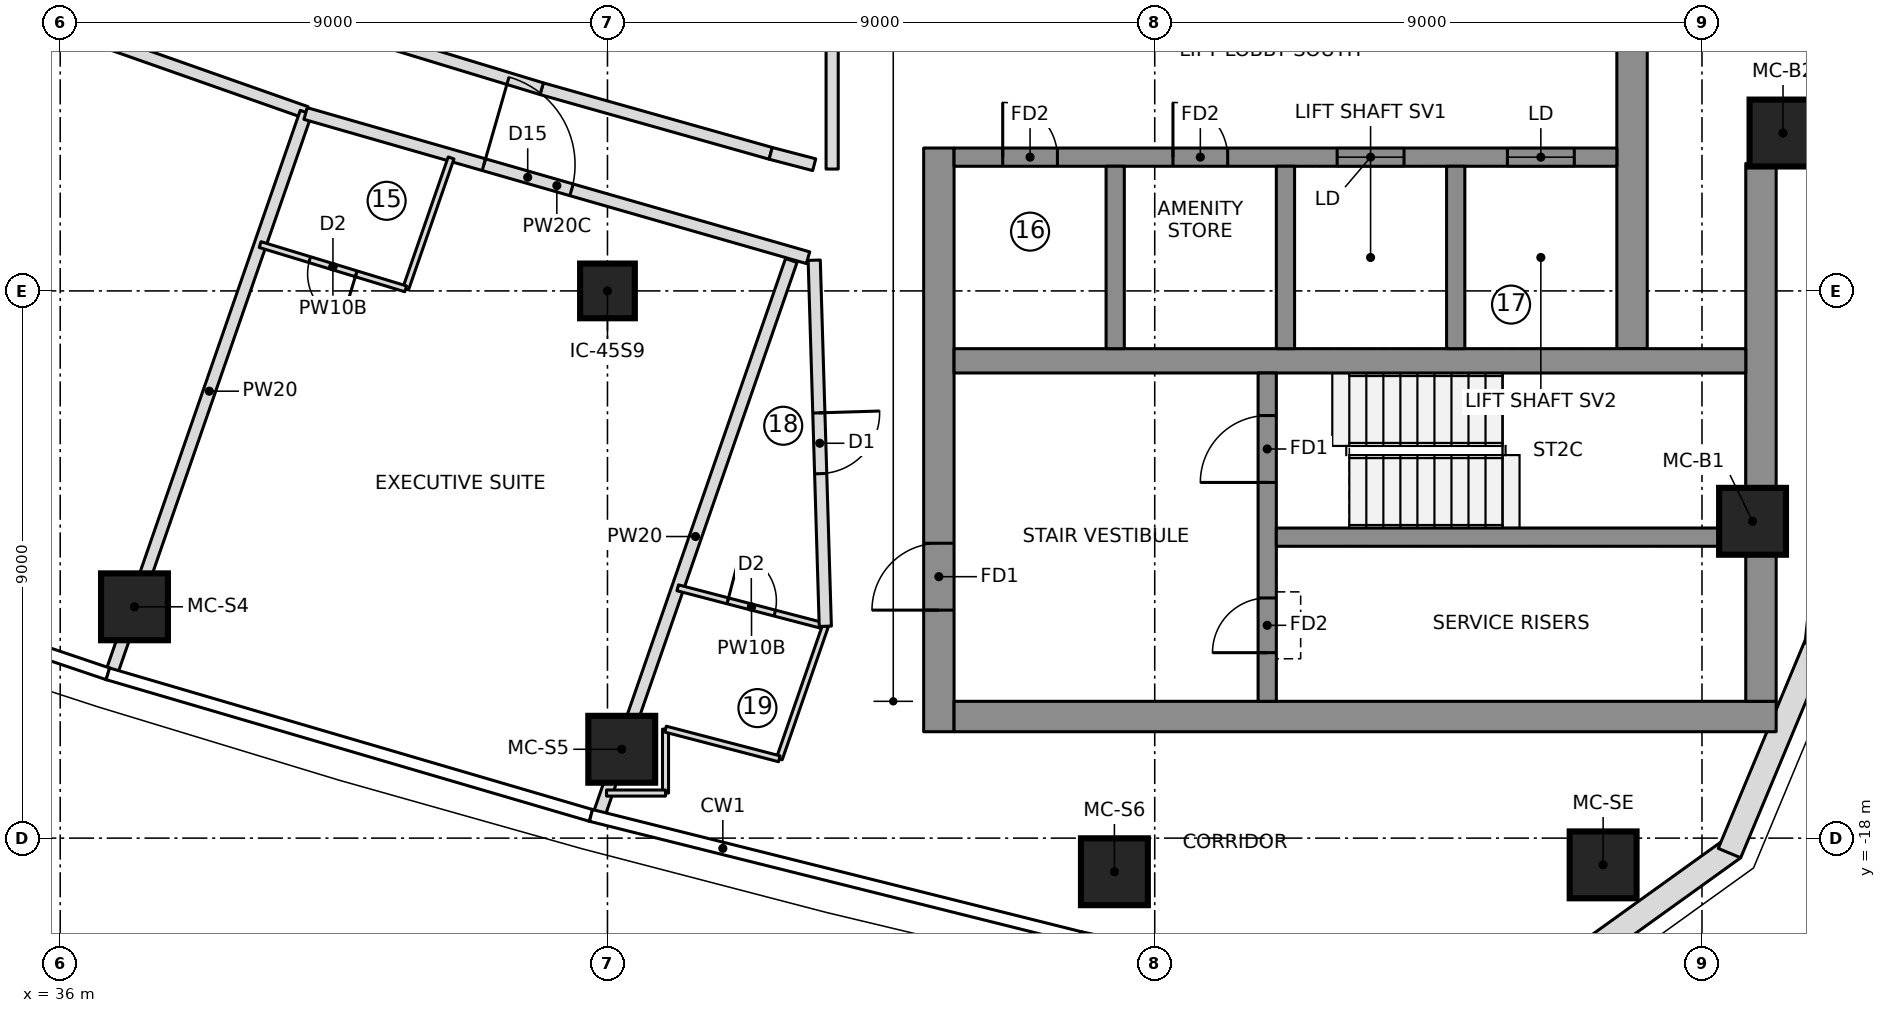
"""IFC4 building model, lengths in metres.
Left out: names, types, materials, properties, quantities, classifications, styles, units other than length and angle.
Written with IfcOpenShell. Run it as: python <this file> out.ifc"""

import sys

from ifc_helpers import new_model, si_unit, direction, frame, frame_2d, origin, origin_2d, place, context, subcontext, project, spatial, polyline, rectangle, outline, extrude, element, fill, save


model = new_model("IFC4")
c1 = context("Model", 3, precision=1e-05, world=origin(), true_north=direction((0.0, 1.0)))
c2 = subcontext(c1, "Body", "Model", "MODEL_VIEW")
j1 = project(units=[si_unit("LENGTHUNIT", "METRE"), si_unit("PLANEANGLEUNIT", "RADIAN")], contexts=[c1])
p1 = place(None, origin())
s1 = spatial("IfcSite", under=j1, at=p1, CompositionType="ELEMENT")
p2 = place(p1, origin())
s2 = spatial("IfcBuilding", under=s1, at=p2, CompositionType="ELEMENT")
p3 = place(p2, frame((0.0, 0.0, 289.2)))
s3 = spatial("IfcBuildingStorey", under=s2, at=p3, CompositionType="ELEMENT", Elevation=289.2)
p4 = place(p3, frame((50.45, -16.25, 0.0), z_axis=(0.0, 0.0, 1.0), x_axis=(0.0, 1.0, 0.0)))
e1 = element("IfcWall", 1, at=p4, inside=s3, PredefinedType="SHEAR", context=c2, shape_type="SweptSolid", body=[
    extrude(rectangle(XDim=9.6, YDim=0.5, at=frame_2d((4.8, 0.0))), origin(), (0.0, 0.0, 1.0), 3.55),
])
p5 = place(p4, frame((2.0, 0.0, 0.0)))
e2 = element("IfcOpeningElement", 2, at=p5, cuts=e1, PredefinedType="OPENING", context=c2, shape_type="SweptSolid", body=[
    extrude(rectangle(XDim=1.1, YDim=2.1, at=frame_2d((0.55, 1.05))), frame((0.0, 0.26, 0.0), z_axis=(0.0, -1.0, 0.0), x_axis=(1.0, 0.0, 0.0)), (0.0, 0.0, 1.0), 0.52),
])
p6 = place(p3, frame((50.7, -16.0, 0.0), z_axis=(0.0, 0.0, 1.0), x_axis=(1.0, 0.0, 0.0)))
e3 = element("IfcWall", 3, at=p6, inside=s3, PredefinedType="SHEAR", context=c2, shape_type="SweptSolid", body=[
    extrude(rectangle(XDim=13.52, YDim=0.5, at=frame_2d((6.76, 0.0))), origin(), (0.0, 0.0, 1.0), 3.55),
])
p7 = place(p3, frame((63.97, -15.75, 0.0), z_axis=(0.0, 0.0, 1.0), x_axis=(0.0, 1.0, 0.0)))
e4 = element("IfcWall", 4, at=p7, inside=s3, PredefinedType="SHEAR", context=c2, shape_type="SweptSolid", body=[
    extrude(rectangle(XDim=8.847, YDim=0.5, at=frame_2d((4.423, 0.0))), origin(), (0.0, 0.0, 1.0), 3.55),
])
p8 = place(p3, frame((61.85, -9.95, 0.0), z_axis=(0.0, 0.0, 1.0), x_axis=(0.0, 1.0, 0.0)))
e5 = element("IfcWall", 5, at=p8, inside=s3, PredefinedType="SHEAR", context=c2, shape_type="SweptSolid", body=[
    extrude(rectangle(XDim=19.9, YDim=0.5, at=frame_2d((9.95, 0.0))), origin(), (0.0, 0.0, 1.0), 3.55),
])
p9 = place(p3, frame((50.7, -10.15, 0.0), z_axis=(0.0, 0.0, 1.0), x_axis=(1.0, 0.0, 0.0)))
e6 = element("IfcWall", 6, at=p9, inside=s3, PredefinedType="SHEAR", context=c2, shape_type="SweptSolid", body=[
    extrude(rectangle(XDim=13.02, YDim=0.4, at=frame_2d((6.51, 0.0))), origin(), (0.0, 0.0, 1.0), 3.55),
])
p10 = place(p3, frame((50.7, -6.8, 0.0), z_axis=(0.0, 0.0, 1.0), x_axis=(1.0, 0.0, 0.0)))
e7 = element("IfcWall", 7, at=p10, inside=s3, PredefinedType="SHEAR", context=c2, shape_type="SweptSolid", body=[
    extrude(rectangle(XDim=10.9, YDim=0.3, at=frame_2d((5.45, 0.0))), origin(), (0.0, 0.0, 1.0), 3.55),
])
p11 = place(p10, frame((6.3, 0.0, 0.0)))
e8 = element("IfcOpeningElement", 8, at=p11, cuts=e7, PredefinedType="OPENING", context=c2, shape_type="SweptSolid", body=[
    extrude(rectangle(XDim=1.1, YDim=2.1, at=frame_2d((0.55, 1.05))), frame((0.0, 0.16, 0.0), z_axis=(0.0, -1.0, 0.0), x_axis=(1.0, 0.0, 0.0)), (0.0, 0.0, 1.0), 0.32),
])
p12 = place(p10, frame((9.1, 0.0, 0.0)))
e9 = element("IfcOpeningElement", 9, at=p12, cuts=e7, PredefinedType="OPENING", context=c2, shape_type="SweptSolid", body=[
    extrude(rectangle(XDim=1.1, YDim=2.1, at=frame_2d((0.55, 1.05))), frame((0.0, 0.16, 0.0), z_axis=(0.0, -1.0, 0.0), x_axis=(1.0, 0.0, 0.0)), (0.0, 0.0, 1.0), 0.32),
])
p13 = place(p10, frame((0.8, 0.0, 0.0)))
e10 = element("IfcOpeningElement", 10, at=p13, cuts=e7, PredefinedType="OPENING", context=c2, shape_type="SweptSolid", body=[
    extrude(rectangle(XDim=0.9, YDim=2.1, at=frame_2d((0.45, 1.05))), frame((0.0, 0.16, 0.0), z_axis=(0.0, -1.0, 0.0), x_axis=(1.0, 0.0, 0.0)), (0.0, 0.0, 1.0), 0.32),
])
p14 = place(p10, frame((3.6, 0.0, 0.0)))
e11 = element("IfcOpeningElement", 11, at=p14, cuts=e7, PredefinedType="OPENING", context=c2, shape_type="SweptSolid", body=[
    extrude(rectangle(XDim=0.9, YDim=2.1, at=frame_2d((0.45, 1.05))), frame((0.0, 0.16, 0.0), z_axis=(0.0, -1.0, 0.0), x_axis=(1.0, 0.0, 0.0)), (0.0, 0.0, 1.0), 0.32),
])
for number, where, z_axis, x_axis in (
    (12, (53.35, -9.95, 0.0), (0.0, 0.0, 1.0), (0.0, 1.0, 0.0)),
    (13, (56.15, -9.95, 0.0), (0.0, 0.0, 1.0), (0.0, 1.0, 0.0)),
    (14, (58.95, -9.95, 0.0), (0.0, 0.0, 1.0), (0.0, 1.0, 0.0)),
):
    element("IfcWall", number, at=place(p3, frame(where, z_axis=z_axis, x_axis=x_axis)), inside=s3, PredefinedType="SHEAR", context=c2, shape_type="SweptSolid", body=[
        extrude(rectangle(XDim=3.0, YDim=0.3, at=frame_2d((1.5, 0.0))), origin(), (0.0, 0.0, 1.0), 3.55),
    ])
p15 = place(p3, frame((55.85, -15.75, 0.0), z_axis=(0.0, 0.0, 1.0), x_axis=(0.0, 1.0, 0.0)))
e15 = element("IfcWall", 15, at=p15, inside=s3, PredefinedType="SHEAR", context=c2, shape_type="SweptSolid", body=[
    extrude(rectangle(XDim=5.4, YDim=0.3, at=frame_2d((2.7, 0.0))), origin(), (0.0, 0.0, 1.0), 3.55),
])
p16 = place(p15, frame((3.6, 0.0, 0.0)))
e16 = element("IfcOpeningElement", 16, at=p16, cuts=e15, PredefinedType="OPENING", context=c2, shape_type="SweptSolid", body=[
    extrude(rectangle(XDim=1.1, YDim=2.1, at=frame_2d((0.55, 1.05))), frame((0.0, 0.16, 0.0), z_axis=(0.0, -1.0, 0.0), x_axis=(1.0, 0.0, 0.0)), (0.0, 0.0, 1.0), 0.32),
])
p17 = place(p15, frame((0.8, 0.0, 0.0)))
e17 = element("IfcOpeningElement", 17, at=p17, cuts=e15, PredefinedType="OPENING", context=c2, shape_type="SweptSolid", body=[
    extrude(rectangle(XDim=0.9, YDim=2.1, at=frame_2d((0.45, 1.05))), frame((0.0, 0.16, 0.0), z_axis=(0.0, -1.0, 0.0), x_axis=(1.0, 0.0, 0.0)), (0.0, 0.0, 1.0), 0.32),
])
p18 = place(p3, frame((56.0, -13.05, 0.0), z_axis=(0.0, 0.0, 1.0), x_axis=(1.0, 0.0, 0.0)))
e18 = element("IfcWall", 18, at=p18, inside=s3, PredefinedType="SHEAR", context=c2, shape_type="SweptSolid", body=[
    extrude(rectangle(XDim=7.72, YDim=0.3, at=frame_2d((3.86, 0.0))), origin(), (0.0, 0.0, 1.0), 3.55),
])
for number, where, z_axis, x_axis in (
    (19, (37.221, -14.196, 0.0), (0.0, 0.0, 1.0), (1.0, 0.0, 0.0)),
    (20, (45.235, -16.539, 0.0), (0.0, 0.0, 1.0), (1.0, 0.0, 0.0)),
    (21, (53.337, -18.553, 0.0), (0.0, 0.0, 1.0), (1.0, 0.0, 0.0)),
    (22, (61.374, -18.44, 0.0), (0.0, 0.0, 1.0), (1.0, 0.0, 0.0)),
    (23, (63.832, -12.789, 0.0), (0.0, 0.0, 1.0), (1.0, 0.0, 0.0)),
    (24, (64.333, -6.403, 0.0), (0.0, 0.0, 1.0), (1.0, 0.0, 0.0)),
):
    element("IfcColumn", number, at=place(p3, frame(where, z_axis=z_axis, x_axis=x_axis)), inside=s3, PredefinedType="COLUMN", context=c2, shape_type="SweptSolid", body=[
        extrude(rectangle(XDim=1.1, YDim=1.1, at=origin_2d()), origin(), (0.0, 0.0, 1.0), 3.55),
    ])
p19 = place(p3, frame((45.0, -9.0, 0.0), z_axis=(0.0, 0.0, 1.0), x_axis=(1.0, 0.0, 0.0)))
e25 = element("IfcColumn", 25, at=p19, inside=s3, PredefinedType="COLUMN", context=c2, shape_type="SweptSolid", body=[
    extrude(rectangle(XDim=0.9, YDim=0.9, at=origin_2d()), origin(), (0.0, 0.0, 1.0), 3.55),
])
p20 = place(p3, frame((52.738, -19.732, 0.0), z_axis=(0.0, 0.0, 1.0), x_axis=(0.977020225348, -0.213146614471, 0.0)))
e26 = element("IfcWall", 26, at=p20, inside=s3, PredefinedType="NOTDEFINED", context=c2, shape_type="SweptSolid", body=[
    extrude(outline(polyline([(0.0, -0.2), (4.171, -0.2), (4.113, 0.2), (0.0, 0.2), (0.0, -0.2)])), origin(), (0.0, 0.0, 1.0), 3.25),
])
p21 = place(p3, frame((60.472, -20.352, 0.0), z_axis=(0.0, 0.0, 1.0), x_axis=(0.811962548682, 0.583709533533, 0.0)))
e27 = element("IfcWall", 27, at=p21, inside=s3, PredefinedType="NOTDEFINED", context=c2, shape_type="SweptSolid", body=[
    extrude(outline(polyline([(-0.057, -0.2), (3.753, -0.2), (3.64, 0.2), (0.057, 0.2), (-0.057, -0.2)])), origin(), (0.0, 0.0, 1.0), 3.25),
])
p22 = place(p3, frame((63.474, -18.194, 0.0), z_axis=(0.0, 0.0, 1.0), x_axis=(0.385285857918, 0.922797273343, 0.0)))
e28 = element("IfcWall", 28, at=p22, inside=s3, PredefinedType="NOTDEFINED", context=c2, shape_type="SweptSolid", body=[
    extrude(outline(polyline([(-0.057, -0.2), (3.726, -0.2), (3.667, 0.2), (0.057, 0.2), (-0.057, -0.2)])), origin(), (0.0, 0.0, 1.0), 3.25),
])
p23 = place(p3, frame((64.898, -14.782, 0.0), z_axis=(0.0, 0.0, 1.0), x_axis=(0.102249826987, 0.994758751096, 0.0)))
e29 = element("IfcWall", 29, at=p23, inside=s3, PredefinedType="NOTDEFINED", context=c2, shape_type="SweptSolid", body=[
    extrude(outline(polyline([(-0.03, -0.2), (4.237, -0.2), (4.23, 0.2), (0.03, 0.2), (-0.03, -0.2)])), origin(), (0.0, 0.0, 1.0), 3.25),
])
p24 = place(p3, frame((26.85, -1.423, 0.0), z_axis=(0.0, 0.0, 1.0), x_axis=(0.943328585164, -0.331860182022, 0.0)))
e30 = element("IfcWall", 30, at=p24, inside=s3, PredefinedType="PARTITIONING", context=c2, shape_type="SweptSolid", body=[
    extrude(rectangle(XDim=13.984, YDim=0.2, at=frame_2d((6.992, 0.0))), origin(), (0.0, 0.0, 1.0), 3.25),
])
p25 = place(p24, frame((3.05, 0.0, 0.0)))
e31 = element("IfcOpeningElement", 31, at=p25, cuts=e30, PredefinedType="OPENING", context=c2, shape_type="SweptSolid", body=[
    extrude(rectangle(XDim=1.5, YDim=2.1, at=frame_2d((0.75, 1.05))), frame((0.0, 0.11, 0.0), z_axis=(0.0, -1.0, 0.0), x_axis=(1.0, 0.0, 0.0)), (0.0, 0.0, 1.0), 0.22),
])
p26 = place(p3, frame((36.861, -15.235, 0.0), z_axis=(0.0, 0.0, 1.0), x_axis=(0.327710853631, 0.944778067279, 0.0)))
e32 = element("IfcWall", 32, at=p26, inside=s3, PredefinedType="PARTITIONING", context=c2, shape_type="SweptSolid", body=[
    extrude(rectangle(XDim=9.707, YDim=0.2, at=frame_2d((4.854, 0.0))), origin(), (0.0, 0.0, 1.0), 3.25),
])
p27 = place(p3, frame((40.035, -6.083, 0.0), z_axis=(0.0, 0.0, 1.0), x_axis=(0.961195333593, -0.275868683759, 0.0)))
e33 = element("IfcWall", 33, at=p27, inside=s3, PredefinedType="PARTITIONING", context=c2, shape_type="SweptSolid", body=[
    extrude(rectangle(XDim=8.597, YDim=0.2, at=frame_2d((4.298, 0.0))), origin(), (0.0, 0.0, 1.0), 3.25),
])
p28 = place(p27, frame((3.05, 0.0, 0.0)))
e34 = element("IfcOpeningElement", 34, at=p28, cuts=e33, PredefinedType="OPENING", context=c2, shape_type="SweptSolid", body=[
    extrude(rectangle(XDim=1.5, YDim=2.1, at=frame_2d((0.75, 1.05))), frame((0.0, 0.11, 0.0), z_axis=(0.0, -1.0, 0.0), x_axis=(1.0, 0.0, 0.0)), (0.0, 0.0, 1.0), 0.22),
])
p29 = place(p3, frame((42.428, -6.813, 0.0), z_axis=(0.0, 0.0, 1.0), x_axis=(-0.327743427431, -0.944766767925, 0.0)))
e35 = element("IfcWall", 35, at=p29, inside=s3, PredefinedType="PARTITIONING", context=c2, shape_type="SweptSolid", body=[
    extrude(rectangle(XDim=2.279, YDim=0.1, at=frame_2d((1.139, 0.0))), origin(), (0.0, 0.0, 1.0), 3.25),
])
p30 = place(p3, frame((41.681, -8.966, 0.0), z_axis=(0.0, 0.0, 1.0), x_axis=(-0.956723503196, 0.290998519638, 0.0)))
e36 = element("IfcWall", 36, at=p30, inside=s3, PredefinedType="PARTITIONING", context=c2, shape_type="SweptSolid", body=[
    extrude(rectangle(XDim=2.502, YDim=0.1, at=frame_2d((1.251, 0.0))), origin(), (0.0, 0.0, 1.0), 3.25),
])
p31 = place(p30, frame((0.85, 0.0, 0.0)))
e37 = element("IfcOpeningElement", 37, at=p31, cuts=e36, PredefinedType="OPENING", context=c2, shape_type="SweptSolid", body=[
    extrude(rectangle(XDim=0.8, YDim=2.1, at=frame_2d((0.4, 1.05))), frame((0.0, 0.06, 0.0), z_axis=(0.0, -1.0, 0.0), x_axis=(1.0, 0.0, 0.0)), (0.0, 0.0, 1.0), 0.12),
])
p32 = place(p3, frame((44.874, -17.579, 0.0), z_axis=(0.0, 0.0, 1.0), x_axis=(0.327705598625, 0.944779890043, 0.0)))
e38 = element("IfcWall", 38, at=p32, inside=s3, PredefinedType="PARTITIONING", context=c2, shape_type="SweptSolid", body=[
    extrude(rectangle(XDim=9.61, YDim=0.2, at=frame_2d((4.805, 0.0))), origin(), (0.0, 0.0, 1.0), 3.25),
])
p33 = place(p3, frame((45.955, -16.208, 0.0), z_axis=(0.0, 0.0, 1.0), x_axis=(0.0, -1.0, 0.0)))
e39 = element("IfcWall", 39, at=p33, inside=s3, PredefinedType="PARTITIONING", context=c2, shape_type="SweptSolid", body=[
    extrude(rectangle(XDim=1.051, YDim=0.1, at=frame_2d((0.525, 0.0))), origin(), (0.0, 0.0, 1.0), 3.25),
])
p34 = place(p3, frame((45.955, -17.259, 0.0), z_axis=(0.0, 0.0, 1.0), x_axis=(-1.0, 0.0, 0.0)))
e40 = element("IfcWall", 40, at=p34, inside=s3, PredefinedType="PARTITIONING", context=c2, shape_type="SweptSolid", body=[
    extrude(rectangle(XDim=0.97, YDim=0.1, at=frame_2d((0.485, 0.0))), origin(), (0.0, 0.0, 1.0), 3.25),
])
p35 = place(p3, frame((46.156, -13.883, 0.0), z_axis=(0.0, 0.0, 1.0), x_axis=(0.967665843663, -0.252235633897, 0.0)))
e41 = element("IfcWall", 41, at=p35, inside=s3, PredefinedType="PARTITIONING", context=c2, shape_type="SweptSolid", body=[
    extrude(rectangle(XDim=2.508, YDim=0.1, at=frame_2d((1.254, 0.0))), origin(), (0.0, 0.0, 1.0), 3.25),
])
p36 = place(p35, frame((0.85, 0.0, 0.0)))
e42 = element("IfcOpeningElement", 42, at=p36, cuts=e41, PredefinedType="OPENING", context=c2, shape_type="SweptSolid", body=[
    extrude(rectangle(XDim=0.8, YDim=2.1, at=frame_2d((0.4, 1.05))), frame((0.0, 0.06, 0.0), z_axis=(0.0, -1.0, 0.0), x_axis=(1.0, 0.0, 0.0)), (0.0, 0.0, 1.0), 0.12),
])
p37 = place(p3, frame((48.583, -14.516, 0.0), z_axis=(0.0, 0.0, 1.0), x_axis=(-0.327695604762, -0.944783356447, 0.0)))
e43 = element("IfcWall", 43, at=p37, inside=s3, PredefinedType="PARTITIONING", context=c2, shape_type="SweptSolid", body=[
    extrude(rectangle(XDim=2.307, YDim=0.1, at=frame_2d((1.154, 0.0))), origin(), (0.0, 0.0, 1.0), 3.25),
])
p38 = place(p3, frame((47.826, -16.696, 0.0), z_axis=(0.0, 0.0, 1.0), x_axis=(-0.967650770907, 0.25229345129, 0.0)))
e44 = element("IfcWall", 44, at=p38, inside=s3, PredefinedType="PARTITIONING", context=c2, shape_type="SweptSolid", body=[
    extrude(rectangle(XDim=1.934, YDim=0.1, at=frame_2d((0.967, 0.0))), origin(), (0.0, 0.0, 1.0), 3.25),
])
p39 = place(p3, frame((47.684, -6.738, 0.0), z_axis=(0.0, 0.0, 1.0), x_axis=(-0.962411212211, 0.271596499628, 0.0)))
e45 = element("IfcWall", 45, at=p39, inside=s3, PredefinedType="PARTITIONING", context=c2, shape_type="SweptSolid", body=[
    extrude(rectangle(XDim=3.913, YDim=0.2, at=frame_2d((1.957, 0.0))), origin(), (0.0, 0.0, 1.0), 3.25),
])
p40 = place(p3, frame((43.918, -5.675, 0.0), z_axis=(0.0, 0.0, 1.0), x_axis=(-0.956717150932, 0.291019403327, 0.0)))
e46 = element("IfcWall", 46, at=p40, inside=s3, PredefinedType="PARTITIONING", context=c2, shape_type="SweptSolid", body=[
    extrude(rectangle(XDim=3.006, YDim=0.2, at=frame_2d((1.503, 0.0))), origin(), (0.0, 0.0, 1.0), 3.25),
])
p41 = place(p3, frame((48.4, -6.924, 0.0), z_axis=(0.0, 0.0, 1.0), x_axis=(-0.967585713416, 0.252542842294, 0.0)))
e47 = element("IfcWall", 47, at=p41, inside=s3, PredefinedType="PARTITIONING", context=c2, shape_type="SweptSolid", body=[
    extrude(rectangle(XDim=0.74, YDim=0.2, at=frame_2d((0.37, 0.0))), origin(), (0.0, 0.0, 1.0), 3.25),
])
p42 = place(p3, frame((48.4, -8.495, 0.0), z_axis=(0.0, 0.0, 1.0), x_axis=(0.030318578026, -0.999540286245, 0.0)))
e48 = element("IfcWall", 48, at=p42, inside=s3, PredefinedType="PARTITIONING", context=c2, shape_type="SweptSolid", body=[
    extrude(rectangle(XDim=6.023, YDim=0.2, at=frame_2d((3.012, 0.0))), origin(), (0.0, 0.0, 1.0), 3.25),
])
p43 = place(p42, frame((2.512, 0.0, 0.0)))
e49 = element("IfcOpeningElement", 49, at=p43, cuts=e48, PredefinedType="OPENING", context=c2, shape_type="SweptSolid", body=[
    extrude(rectangle(XDim=1.0, YDim=2.1, at=frame_2d((0.5, 1.05))), frame((0.0, 0.11, 0.0), z_axis=(0.0, -1.0, 0.0), x_axis=(1.0, 0.0, 0.0)), (0.0, 0.0, 1.0), 0.22),
])
p44 = place(p3, frame((48.695, 6.996, 0.0), z_axis=(0.0, 0.0, 1.0), x_axis=(0.0, -1.0, 0.0)))
e50 = element("IfcWall", 50, at=p44, inside=s3, PredefinedType="PARTITIONING", context=c2, shape_type="SweptSolid", body=[
    extrude(rectangle(XDim=13.992, YDim=0.2, at=frame_2d((6.996, 0.0))), origin(), (0.0, 0.0, 1.0), 3.25),
])
p45 = place(p31, origin())
e51 = element("IfcDoor", 51, at=p45, inside=s3, OperationType="SINGLE_SWING_LEFT", PredefinedType="DOOR", context=c2, shape_type="SweptSolid", body=[
    extrude(rectangle(XDim=0.8, YDim=2.1, at=frame_2d((0.4, 1.05))), frame((0.0, 0.025, 0.0), z_axis=(0.0, -1.0, 0.0), x_axis=(1.0, 0.0, 0.0)), (0.0, 0.0, 1.0), 0.05),
])
fill(e37, e51)
p46 = place(p28, origin())
e52 = element("IfcDoor", 52, at=p46, inside=s3, OperationType="DOUBLE_DOOR_SINGLE_SWING", PredefinedType="DOOR", context=c2, shape_type="SweptSolid", body=[
    extrude(rectangle(XDim=1.5, YDim=2.1, at=frame_2d((0.75, 1.05))), frame((0.0, 0.025, 0.0), z_axis=(0.0, -1.0, 0.0), x_axis=(1.0, 0.0, 0.0)), (0.0, 0.0, 1.0), 0.05),
])
fill(e34, e52)
p47 = place(p36, origin())
e53 = element("IfcDoor", 53, at=p47, inside=s3, OperationType="SINGLE_SWING_LEFT", PredefinedType="DOOR", context=c2, shape_type="SweptSolid", body=[
    extrude(rectangle(XDim=0.8, YDim=2.1, at=frame_2d((0.4, 1.05))), frame((0.0, 0.025, 0.0), z_axis=(0.0, -1.0, 0.0), x_axis=(1.0, 0.0, 0.0)), (0.0, 0.0, 1.0), 0.05),
])
fill(e42, e53)
p48 = place(p43, origin())
e54 = element("IfcDoor", 54, at=p48, inside=s3, OperationType="SINGLE_SWING_LEFT", PredefinedType="DOOR", context=c2, shape_type="SweptSolid", body=[
    extrude(rectangle(XDim=1.0, YDim=2.1, at=frame_2d((0.5, 1.05))), frame((0.0, 0.025, 0.0), z_axis=(0.0, -1.0, 0.0), x_axis=(1.0, 0.0, 0.0)), (0.0, 0.0, 1.0), 0.05),
])
fill(e49, e54)
p49 = place(p11, origin())
e55 = element("IfcDoor", 55, at=p49, inside=s3, OperationType="DOUBLE_DOOR_SLIDING", PredefinedType="DOOR", context=c2, shape_type="SweptSolid", body=[
    extrude(rectangle(XDim=1.1, YDim=2.1, at=frame_2d((0.55, 1.05))), frame((0.0, 0.025, 0.0), z_axis=(0.0, -1.0, 0.0), x_axis=(1.0, 0.0, 0.0)), (0.0, 0.0, 1.0), 0.05),
])
fill(e8, e55)
p50 = place(p12, origin())
e56 = element("IfcDoor", 56, at=p50, inside=s3, OperationType="DOUBLE_DOOR_SLIDING", PredefinedType="DOOR", context=c2, shape_type="SweptSolid", body=[
    extrude(rectangle(XDim=1.1, YDim=2.1, at=frame_2d((0.55, 1.05))), frame((0.0, 0.025, 0.0), z_axis=(0.0, -1.0, 0.0), x_axis=(1.0, 0.0, 0.0)), (0.0, 0.0, 1.0), 0.05),
])
fill(e9, e56)
p51 = place(p16, origin())
e57 = element("IfcDoor", 57, at=p51, inside=s3, OperationType="SINGLE_SWING_RIGHT", PredefinedType="DOOR", context=c2, shape_type="SweptSolid", body=[
    extrude(rectangle(XDim=1.1, YDim=2.1, at=frame_2d((0.55, 1.05))), frame((0.0, 0.025, 0.0), z_axis=(0.0, -1.0, 0.0), x_axis=(1.0, 0.0, 0.0)), (0.0, 0.0, 1.0), 0.05),
])
fill(e16, e57)
p52 = place(p5, origin())
e58 = element("IfcDoor", 58, at=p52, inside=s3, OperationType="SINGLE_SWING_RIGHT", PredefinedType="DOOR", context=c2, shape_type="SweptSolid", body=[
    extrude(rectangle(XDim=1.1, YDim=2.1, at=frame_2d((0.55, 1.05))), frame((0.0, 0.025, 0.0), z_axis=(0.0, -1.0, 0.0), x_axis=(1.0, 0.0, 0.0)), (0.0, 0.0, 1.0), 0.05),
])
fill(e2, e58)
p53 = place(p17, origin())
e59 = element("IfcDoor", 59, at=p53, inside=s3, OperationType="SINGLE_SWING_LEFT", PredefinedType="DOOR", context=c2, shape_type="SweptSolid", body=[
    extrude(rectangle(XDim=0.9, YDim=2.1, at=frame_2d((0.45, 1.05))), frame((0.0, 0.025, 0.0), z_axis=(0.0, -1.0, 0.0), x_axis=(1.0, 0.0, 0.0)), (0.0, 0.0, 1.0), 0.05),
])
fill(e17, e59)
p54 = place(p13, origin())
e60 = element("IfcDoor", 60, at=p54, inside=s3, OperationType="SINGLE_SWING_LEFT", PredefinedType="DOOR", context=c2, shape_type="SweptSolid", body=[
    extrude(rectangle(XDim=0.9, YDim=2.1, at=frame_2d((0.45, 1.05))), frame((0.0, 0.025, 0.0), z_axis=(0.0, -1.0, 0.0), x_axis=(1.0, 0.0, 0.0)), (0.0, 0.0, 1.0), 0.05),
])
fill(e10, e60)
p55 = place(p14, origin())
e61 = element("IfcDoor", 61, at=p55, inside=s3, OperationType="SINGLE_SWING_LEFT", PredefinedType="DOOR", context=c2, shape_type="SweptSolid", body=[
    extrude(rectangle(XDim=0.9, YDim=2.1, at=frame_2d((0.45, 1.05))), frame((0.0, 0.025, 0.0), z_axis=(0.0, -1.0, 0.0), x_axis=(1.0, 0.0, 0.0)), (0.0, 0.0, 1.0), 0.05),
])
fill(e11, e61)
save(model, sys.argv[1])
